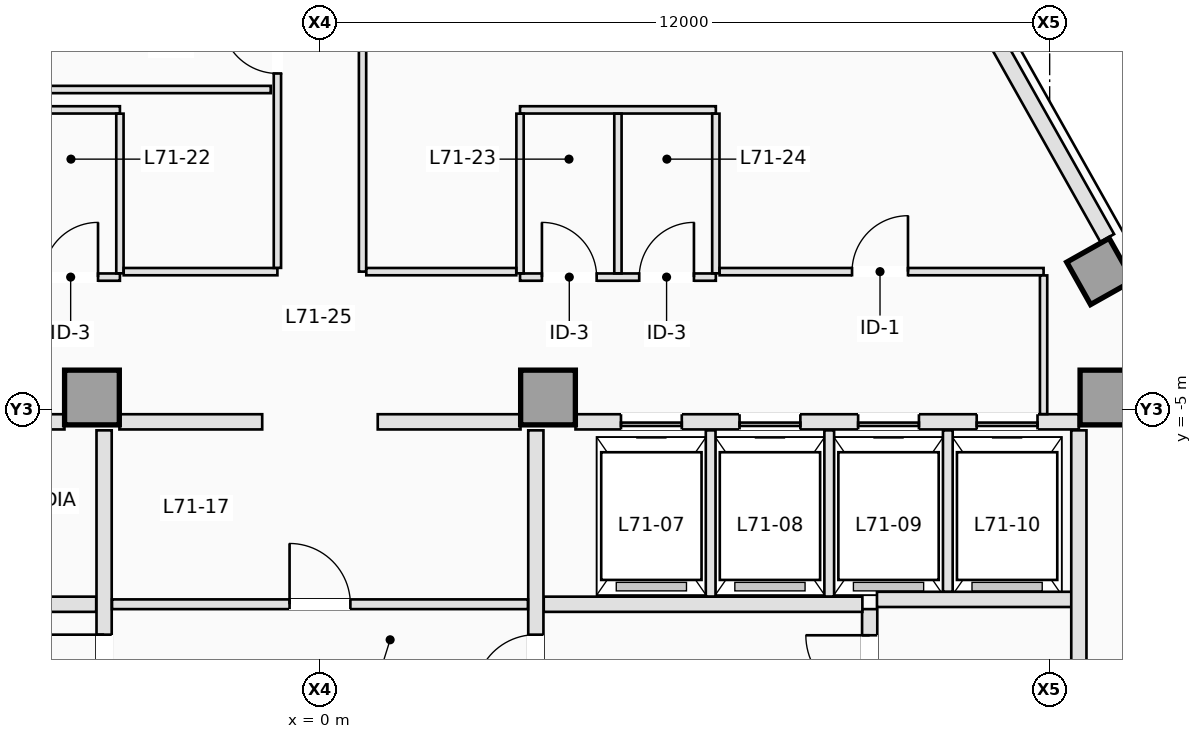
"""IFC4 building model, lengths in metres.
Left out: names, types, materials, properties, quantities, classifications, styles, units other than length and angle.
Written with IfcOpenShell. Run it as: python <this file> out.ifc"""

import sys

from ifc_helpers import new_model, si_unit, direction, frame, frame_2d, origin, origin_2d, place, context, subcontext, project, spatial, rectangle, extrude, element, fill, save


model = new_model("IFC4")
c1 = context("Model", 3, precision=1e-05, world=origin(), true_north=direction((0.0, 1.0)))
c2 = subcontext(c1, "Body", "Model", "MODEL_VIEW")
j1 = project(units=[si_unit("LENGTHUNIT", "METRE"), si_unit("PLANEANGLEUNIT", "RADIAN")], contexts=[c1])
p1 = place(None, origin())
s1 = spatial("IfcSite", under=j1, at=p1, CompositionType="ELEMENT")
p2 = place(p1, origin())
s2 = spatial("IfcBuilding", under=s1, at=p2, CompositionType="ELEMENT")
p3 = place(p2, frame((0.0, 0.0, 256.9)))
s3 = spatial("IfcBuildingStorey", under=s2, at=p3, CompositionType="ELEMENT", Elevation=256.9)
for number, where, z_axis, x_axis in (
    (1, (-3.75, -4.8, 0.0), (0.0, 0.0, 1.0), (1.0, 0.0, 0.0)),
    (2, (3.75, -4.8, 0.0), (0.0, 0.0, 1.0), (1.0, 0.0, 0.0)),
    (3, (12.95, -4.8, 0.0), (0.0, 0.0, 1.0), (1.0, 0.0, 0.0)),
):
    element("IfcColumn", number, at=place(p3, frame(where, z_axis=z_axis, x_axis=x_axis)), inside=s3, PredefinedType="COLUMN", context=c2, shape_type="SweptSolid", body=[
        extrude(rectangle(XDim=0.9, YDim=0.9, at=origin_2d()), origin(), (0.0, 0.0, 1.0), 3.5),
    ])
p4 = place(p3, frame((12.825, -2.727, 0.0), z_axis=(0.0, 0.0, 1.0), x_axis=(0.871575139605, 0.490261946333, 0.0)))
e4 = element("IfcColumn", 4, at=p4, inside=s3, PredefinedType="COLUMN", context=c2, shape_type="SweptSolid", body=[
    extrude(rectangle(XDim=0.8, YDim=0.8, at=origin_2d()), origin(), (0.0, 0.0, 1.0), 3.5),
])
p5 = place(p3, frame((10.869, 1.516, 0.0), z_axis=(0.0, 0.0, 1.0), x_axis=(0.490244825075, -0.871584770109, 0.0)))
e5 = element("IfcWall", 5, at=p5, inside=s3, PredefinedType="STANDARD", context=c2, shape_type="SweptSolid", body=[
    extrude(rectangle(XDim=4.237, YDim=0.26, at=frame_2d((2.119, 0.0))), origin(), (0.0, 0.0, 1.0), 3.25),
])
p6 = place(p3, frame((9.04, -10.18, 0.0), z_axis=(0.0, 0.0, 1.0), x_axis=(0.0, 1.0, 0.0)))
e6 = element("IfcWall", 6, at=p6, inside=s3, PredefinedType="PARTITIONING", context=c2, shape_type="SweptSolid", body=[
    extrude(rectangle(XDim=1.9, YDim=0.25, at=frame_2d((0.95, 0.0))), origin(), (0.0, 0.0, 1.0), 3.25),
])
p7 = place(p6, frame((0.42, 0.0, 0.0)))
e7 = element("IfcOpeningElement", 7, at=p7, cuts=e6, PredefinedType="OPENING", context=c2, shape_type="SweptSolid", body=[
    extrude(rectangle(XDim=1.05, YDim=2.15, at=frame_2d((0.525, 1.075))), frame((0.0, 0.135, 0.0), z_axis=(0.0, -1.0, 0.0), x_axis=(1.0, 0.0, 0.0)), (0.0, 0.0, 1.0), 0.27),
])
p8 = place(p3, frame((9.16, -8.12, 0.0), z_axis=(0.0, 0.0, 1.0), x_axis=(1.0, 0.0, 0.0)))
e8 = element("IfcWall", 8, at=p8, inside=s3, PredefinedType="PARTITIONING", context=c2, shape_type="SweptSolid", body=[
    extrude(rectangle(XDim=3.22, YDim=0.25, at=frame_2d((1.61, 0.0))), origin(), (0.0, 0.0, 1.0), 3.25),
])
p9 = place(p3, frame((12.48, -10.18, 0.0), z_axis=(0.0, 0.0, 1.0), x_axis=(0.0, 1.0, 0.0)))
e9 = element("IfcWall", 9, at=p9, inside=s3, PredefinedType="PARTITIONING", context=c2, shape_type="SweptSolid", body=[
    extrude(rectangle(XDim=4.84, YDim=0.25, at=frame_2d((2.42, 0.0))), origin(), (0.0, 0.0, 1.0), 3.25),
])
for number, where, z_axis, x_axis in (
    (10, (-8.92, -8.2, 0.0), (0.0, 0.0, 1.0), (1.0, 0.0, 0.0)),
    (11, (3.68, -8.2, 0.0), (0.0, 0.0, 1.0), (1.0, 0.0, 0.0)),
):
    element("IfcWall", number, at=place(p3, frame(where, z_axis=z_axis, x_axis=x_axis)), inside=s3, PredefinedType="PARTITIONING", context=c2, shape_type="SweptSolid", body=[
        extrude(rectangle(XDim=5.24, YDim=0.25, at=frame_2d((2.62, 0.0))), origin(), (0.0, 0.0, 1.0), 3.25),
    ])
p10 = place(p3, frame((-3.55, -15.898, 0.0), z_axis=(0.0, 0.0, 1.0), x_axis=(0.0, 1.0, 0.0)))
e12 = element("IfcWall", 12, at=p10, inside=s3, PredefinedType="PARTITIONING", context=c2, shape_type="SweptSolid", body=[
    extrude(rectangle(XDim=10.558, YDim=0.25, at=frame_2d((5.279, 0.0))), origin(), (0.0, 0.0, 1.0), 3.25),
])
p11 = place(p10, frame((6.198, 0.0, 0.0)))
e13 = element("IfcOpeningElement", 13, at=p11, cuts=e12, PredefinedType="OPENING", context=c2, shape_type="SweptSolid", body=[
    extrude(rectangle(XDim=1.0, YDim=2.15, at=frame_2d((0.5, 1.075))), frame((0.0, 0.135, 0.0), z_axis=(0.0, -1.0, 0.0), x_axis=(1.0, 0.0, 0.0)), (0.0, 0.0, 1.0), 0.27),
])
p12 = place(p3, frame((3.55, -15.898, 0.0), z_axis=(0.0, 0.0, 1.0), x_axis=(0.0, 1.0, 0.0)))
e14 = element("IfcWall", 14, at=p12, inside=s3, PredefinedType="PARTITIONING", context=c2, shape_type="SweptSolid", body=[
    extrude(rectangle(XDim=10.558, YDim=0.25, at=frame_2d((5.279, 0.0))), origin(), (0.0, 0.0, 1.0), 3.25),
])
p13 = place(p12, frame((6.198, 0.0, 0.0)))
e15 = element("IfcOpeningElement", 15, at=p13, cuts=e14, PredefinedType="OPENING", context=c2, shape_type="SweptSolid", body=[
    extrude(rectangle(XDim=1.0, YDim=2.15, at=frame_2d((0.5, 1.075))), frame((0.0, 0.135, 0.0), z_axis=(0.0, -1.0, 0.0), x_axis=(1.0, 0.0, 0.0)), (0.0, 0.0, 1.0), 0.27),
])
p14 = place(p3, frame((-12.48, -5.2, 0.0), z_axis=(0.0, 0.0, 1.0), x_axis=(1.0, 0.0, 0.0)))
e16 = element("IfcWall", 16, at=p14, inside=s3, PredefinedType="PARTITIONING", context=c2, shape_type="SweptSolid", body=[
    extrude(rectangle(XDim=8.278, YDim=0.25, at=frame_2d((4.139, 0.0))), origin(), (0.0, 0.0, 1.0), 3.25),
])
p15 = place(p14, frame((3.05, 0.0, 0.0)))
e17 = element("IfcOpeningElement", 17, at=p15, cuts=e16, PredefinedType="OPENING", context=c2, shape_type="SweptSolid", body=[
    extrude(rectangle(XDim=0.92, YDim=2.12, at=frame_2d((0.46, 1.06))), frame((0.0, 0.135, 0.0), z_axis=(0.0, -1.0, 0.0), x_axis=(1.0, 0.0, 0.0)), (0.0, 0.0, 1.0), 0.27),
])
p16 = place(p14, frame((6.15, 0.0, 0.0)))
e18 = element("IfcOpeningElement", 18, at=p16, cuts=e16, PredefinedType="OPENING", context=c2, shape_type="SweptSolid", body=[
    extrude(rectangle(XDim=0.92, YDim=2.12, at=frame_2d((0.46, 1.06))), frame((0.0, 0.135, 0.0), z_axis=(0.0, -1.0, 0.0), x_axis=(1.0, 0.0, 0.0)), (0.0, 0.0, 1.0), 0.27),
])
p17 = place(p3, frame((4.202, -5.2, 0.0), z_axis=(0.0, 0.0, 1.0), x_axis=(1.0, 0.0, 0.0)))
e19 = element("IfcWall", 19, at=p17, inside=s3, PredefinedType="PARTITIONING", context=c2, shape_type="SweptSolid", body=[
    extrude(rectangle(XDim=8.278, YDim=0.25, at=frame_2d((4.139, 0.0))), origin(), (0.0, 0.0, 1.0), 3.25),
])
p18 = place(p17, frame((0.748, 0.0, 0.0)))
e20 = element("IfcOpeningElement", 20, at=p18, cuts=e19, PredefinedType="OPENING", context=c2, shape_type="SweptSolid", body=[
    extrude(rectangle(XDim=1.0, YDim=2.15, at=frame_2d((0.5, 1.075))), frame((0.0, 0.135, 0.0), z_axis=(0.0, -1.0, 0.0), x_axis=(1.0, 0.0, 0.0)), (0.0, 0.0, 1.0), 0.27),
])
p19 = place(p17, frame((2.698, 0.0, 0.0)))
e21 = element("IfcOpeningElement", 21, at=p19, cuts=e19, PredefinedType="OPENING", context=c2, shape_type="SweptSolid", body=[
    extrude(rectangle(XDim=1.0, YDim=2.15, at=frame_2d((0.5, 1.075))), frame((0.0, 0.135, 0.0), z_axis=(0.0, -1.0, 0.0), x_axis=(1.0, 0.0, 0.0)), (0.0, 0.0, 1.0), 0.27),
])
p20 = place(p17, frame((4.648, 0.0, 0.0)))
e22 = element("IfcOpeningElement", 22, at=p20, cuts=e19, PredefinedType="OPENING", context=c2, shape_type="SweptSolid", body=[
    extrude(rectangle(XDim=1.0, YDim=2.15, at=frame_2d((0.5, 1.075))), frame((0.0, 0.135, 0.0), z_axis=(0.0, -1.0, 0.0), x_axis=(1.0, 0.0, 0.0)), (0.0, 0.0, 1.0), 0.27),
])
p21 = place(p17, frame((6.598, 0.0, 0.0)))
e23 = element("IfcOpeningElement", 23, at=p21, cuts=e19, PredefinedType="OPENING", context=c2, shape_type="SweptSolid", body=[
    extrude(rectangle(XDim=1.0, YDim=2.15, at=frame_2d((0.5, 1.075))), frame((0.0, 0.135, 0.0), z_axis=(0.0, -1.0, 0.0), x_axis=(1.0, 0.0, 0.0)), (0.0, 0.0, 1.0), 0.27),
])
for number, where, z_axis, x_axis in (
    (24, (-3.298, -5.2, 0.0), (0.0, 0.0, 1.0), (1.0, 0.0, 0.0)),
    (25, (0.95, -5.2, 0.0), (0.0, 0.0, 1.0), (1.0, 0.0, 0.0)),
):
    element("IfcWall", number, at=place(p3, frame(where, z_axis=z_axis, x_axis=x_axis)), inside=s3, PredefinedType="PARTITIONING", context=c2, shape_type="SweptSolid", body=[
        extrude(rectangle(XDim=2.348, YDim=0.25, at=frame_2d((1.174, 0.0))), origin(), (0.0, 0.0, 1.0), 3.25),
    ])
for number, where, z_axis, x_axis in (
    (26, (6.425, -8.073, 0.0), (0.0, 0.0, 1.0), (0.0, 1.0, 0.0)),
    (27, (8.375, -8.073, 0.0), (0.0, 0.0, 1.0), (0.0, 1.0, 0.0)),
):
    element("IfcWall", number, at=place(p3, frame(where, z_axis=z_axis, x_axis=x_axis)), inside=s3, PredefinedType="PARTITIONING", context=c2, shape_type="SweptSolid", body=[
        extrude(rectangle(XDim=2.733, YDim=0.16, at=frame_2d((1.366, 0.0))), origin(), (0.0, 0.0, 1.0), 3.25),
    ])
p22 = place(p3, frame((10.325, -7.993, 0.0), z_axis=(0.0, 0.0, 1.0), x_axis=(0.0, 1.0, 0.0)))
e28 = element("IfcWall", 28, at=p22, inside=s3, PredefinedType="PARTITIONING", context=c2, shape_type="SweptSolid", body=[
    extrude(rectangle(XDim=2.653, YDim=0.16, at=frame_2d((1.326, 0.0))), origin(), (0.0, 0.0, 1.0), 3.25),
])
p23 = place(p3, frame((-3.42, -8.2, 0.0), z_axis=(0.0, 0.0, 1.0), x_axis=(1.0, 0.0, 0.0)))
e29 = element("IfcWall", 29, at=p23, inside=s3, PredefinedType="PARTITIONING", context=c2, shape_type="SweptSolid", body=[
    extrude(rectangle(XDim=6.84, YDim=0.16, at=frame_2d((3.42, 0.0))), origin(), (0.0, 0.0, 1.0), 3.25),
])
p24 = place(p23, frame((2.92, 0.0, 0.0)))
e30 = element("IfcOpeningElement", 30, at=p24, cuts=e29, PredefinedType="OPENING", context=c2, shape_type="SweptSolid", body=[
    extrude(rectangle(XDim=1.0, YDim=2.15, at=frame_2d((0.5, 1.075))), frame((0.0, 0.09, 0.0), z_axis=(0.0, -1.0, 0.0), x_axis=(1.0, 0.0, 0.0)), (0.0, 0.0, 1.0), 0.18),
])
p25 = place(p3, frame((-6.51, -2.82, 0.0), z_axis=(0.0, 0.0, 1.0), x_axis=(1.0, 0.0, 0.0)))
e31 = element("IfcWall", 31, at=p25, inside=s3, PredefinedType="PARTITIONING", context=c2, shape_type="SweptSolid", body=[
    extrude(rectangle(XDim=3.22, YDim=0.12, at=frame_2d((1.61, 0.0))), origin(), (0.0, 0.0, 1.0), 2.943),
])
p26 = place(p25, frame((0.36, 0.0, 0.0)))
e32 = element("IfcOpeningElement", 32, at=p26, cuts=e31, PredefinedType="OPENING", context=c2, shape_type="SweptSolid", body=[
    extrude(rectangle(XDim=0.9, YDim=2.12, at=frame_2d((0.45, 1.06))), frame((0.0, 0.07, 0.0), z_axis=(0.0, -1.0, 0.0), x_axis=(1.0, 0.0, 0.0)), (0.0, 0.0, 1.0), 0.14),
])
p27 = place(p25, frame((1.96, 0.0, 0.0)))
e33 = element("IfcOpeningElement", 33, at=p27, cuts=e31, PredefinedType="OPENING", context=c2, shape_type="SweptSolid", body=[
    extrude(rectangle(XDim=0.9, YDim=2.12, at=frame_2d((0.45, 1.06))), frame((0.0, 0.07, 0.0), z_axis=(0.0, -1.0, 0.0), x_axis=(1.0, 0.0, 0.0)), (0.0, 0.0, 1.0), 0.14),
])
p28 = place(p3, frame((-6.51, -0.07, 0.0), z_axis=(0.0, 0.0, 1.0), x_axis=(1.0, 0.0, 0.0)))
e34 = element("IfcWall", 34, at=p28, inside=s3, PredefinedType="PARTITIONING", context=c2, shape_type="SweptSolid", body=[
    extrude(rectangle(XDim=3.22, YDim=0.12, at=frame_2d((1.61, 0.0))), origin(), (0.0, 0.0, 1.0), 3.25),
])
p29 = place(p3, frame((-3.29, -2.758, 0.0), z_axis=(0.0, 0.0, 1.0), x_axis=(0.0, 1.0, 0.0)))
e35 = element("IfcWall", 35, at=p29, inside=s3, PredefinedType="PARTITIONING", context=c2, shape_type="SweptSolid", body=[
    extrude(rectangle(XDim=2.626, YDim=0.12, at=frame_2d((1.313, 0.0))), origin(), (0.0, 0.0, 1.0), 2.79),
])
p30 = place(p3, frame((3.29, -2.82, 0.0), z_axis=(0.0, 0.0, 1.0), x_axis=(1.0, 0.0, 0.0)))
e36 = element("IfcWall", 36, at=p30, inside=s3, PredefinedType="PARTITIONING", context=c2, shape_type="SweptSolid", body=[
    extrude(rectangle(XDim=3.22, YDim=0.12, at=frame_2d((1.61, 0.0))), origin(), (0.0, 0.0, 1.0), 2.943),
])
p31 = place(p30, frame((0.36, 0.0, 0.0)))
e37 = element("IfcOpeningElement", 37, at=p31, cuts=e36, PredefinedType="OPENING", context=c2, shape_type="SweptSolid", body=[
    extrude(rectangle(XDim=0.9, YDim=2.12, at=frame_2d((0.45, 1.06))), frame((0.0, 0.07, 0.0), z_axis=(0.0, -1.0, 0.0), x_axis=(1.0, 0.0, 0.0)), (0.0, 0.0, 1.0), 0.14),
])
p32 = place(p30, frame((1.96, 0.0, 0.0)))
e38 = element("IfcOpeningElement", 38, at=p32, cuts=e36, PredefinedType="OPENING", context=c2, shape_type="SweptSolid", body=[
    extrude(rectangle(XDim=0.9, YDim=2.12, at=frame_2d((0.45, 1.06))), frame((0.0, 0.07, 0.0), z_axis=(0.0, -1.0, 0.0), x_axis=(1.0, 0.0, 0.0)), (0.0, 0.0, 1.0), 0.14),
])
p33 = place(p3, frame((3.29, -0.07, 0.0), z_axis=(0.0, 0.0, 1.0), x_axis=(1.0, 0.0, 0.0)))
e39 = element("IfcWall", 39, at=p33, inside=s3, PredefinedType="PARTITIONING", context=c2, shape_type="SweptSolid", body=[
    extrude(rectangle(XDim=3.22, YDim=0.12, at=frame_2d((1.61, 0.0))), origin(), (0.0, 0.0, 1.0), 3.25),
])
p34 = place(p3, frame((3.29, -2.758, 0.0), z_axis=(0.0, 0.0, 1.0), x_axis=(0.0, 1.0, 0.0)))
e40 = element("IfcWall", 40, at=p34, inside=s3, PredefinedType="PARTITIONING", context=c2, shape_type="SweptSolid", body=[
    extrude(rectangle(XDim=2.626, YDim=0.12, at=frame_2d((1.313, 0.0))), origin(), (0.0, 0.0, 1.0), 2.79),
])
for number, where, z_axis, x_axis in (
    (41, (4.9, -2.758, 0.0), (0.0, 0.0, 1.0), (0.0, 1.0, 0.0)),
    (42, (6.51, -2.758, 0.0), (0.0, 0.0, 1.0), (0.0, 1.0, 0.0)),
):
    element("IfcWall", number, at=place(p3, frame(where, z_axis=z_axis, x_axis=x_axis)), inside=s3, PredefinedType="PARTITIONING", context=c2, shape_type="SweptSolid", body=[
        extrude(rectangle(XDim=2.626, YDim=0.12, at=frame_2d((1.313, 0.0))), origin(), (0.0, 0.0, 1.0), 3.25),
    ])
p35 = place(p3, frame((-3.228, -2.73, 0.0), z_axis=(0.0, 0.0, 1.0), x_axis=(1.0, 0.0, 0.0)))
e43 = element("IfcWall", 43, at=p35, inside=s3, PredefinedType="PARTITIONING", context=c2, shape_type="SweptSolid", body=[
    extrude(rectangle(XDim=2.528, YDim=0.12, at=frame_2d((1.264, 0.0))), origin(), (0.0, 0.0, 1.0), 2.943),
])
p36 = place(p3, frame((-0.7, -2.668, 0.0), z_axis=(0.0, 0.0, 1.0), x_axis=(0.0, 1.0, 0.0)))
e44 = element("IfcWall", 44, at=p36, inside=s3, PredefinedType="PARTITIONING", context=c2, shape_type="SweptSolid", body=[
    extrude(rectangle(XDim=5.968, YDim=0.12, at=frame_2d((2.984, 0.0))), origin(), (0.0, 0.0, 1.0), 3.25),
])
p37 = place(p36, frame((3.197, 0.0, 0.0)))
e45 = element("IfcOpeningElement", 45, at=p37, cuts=e44, PredefinedType="OPENING", context=c2, shape_type="SweptSolid", body=[
    extrude(rectangle(XDim=0.92, YDim=2.12, at=frame_2d((0.46, 1.06))), frame((0.0, 0.07, 0.0), z_axis=(0.0, -1.0, 0.0), x_axis=(1.0, 0.0, 0.0)), (0.0, 0.0, 1.0), 0.14),
])
p38 = place(p3, frame((0.7, 3.238, 0.0), z_axis=(0.0, 0.0, 1.0), x_axis=(0.0, -1.0, 0.0)))
e46 = element("IfcWall", 46, at=p38, inside=s3, PredefinedType="PARTITIONING", context=c2, shape_type="SweptSolid", body=[
    extrude(rectangle(XDim=5.968, YDim=0.12, at=frame_2d((2.984, 0.0))), origin(), (0.0, 0.0, 1.0), 3.25),
])
p39 = place(p3, frame((0.762, -2.73, 0.0), z_axis=(0.0, 0.0, 1.0), x_axis=(1.0, 0.0, 0.0)))
e47 = element("IfcWall", 47, at=p39, inside=s3, PredefinedType="PARTITIONING", context=c2, shape_type="SweptSolid", body=[
    extrude(rectangle(XDim=2.466, YDim=0.12, at=frame_2d((1.233, 0.0))), origin(), (0.0, 0.0, 1.0), 2.943),
])
p40 = place(p3, frame((6.572, -2.73, 0.0), z_axis=(0.0, 0.0, 1.0), x_axis=(1.0, 0.0, 0.0)))
e48 = element("IfcWall", 48, at=p40, inside=s3, PredefinedType="PARTITIONING", context=c2, shape_type="SweptSolid", body=[
    extrude(rectangle(XDim=5.328, YDim=0.12, at=frame_2d((2.664, 0.0))), origin(), (0.0, 0.0, 1.0), 3.25),
])
p41 = place(p40, frame((2.178, 0.0, 0.0)))
e49 = element("IfcOpeningElement", 49, at=p41, cuts=e48, PredefinedType="OPENING", context=c2, shape_type="SweptSolid", body=[
    extrude(rectangle(XDim=0.92, YDim=2.12, at=frame_2d((0.46, 1.06))), frame((0.0, 0.07, 0.0), z_axis=(0.0, -1.0, 0.0), x_axis=(1.0, 0.0, 0.0)), (0.0, 0.0, 1.0), 0.14),
])
p42 = place(p3, frame((11.9, -2.792, 0.0), z_axis=(0.0, 0.0, 1.0), x_axis=(0.0, -1.0, 0.0)))
e50 = element("IfcWall", 50, at=p42, inside=s3, PredefinedType="PARTITIONING", context=c2, shape_type="SweptSolid", body=[
    extrude(rectangle(XDim=2.281, YDim=0.12, at=frame_2d((1.141, 0.0))), origin(), (0.0, 0.0, 1.0), 3.25),
])
p43 = place(p3, frame((-0.81, 0.265, 0.0), z_axis=(0.0, 0.0, 1.0), x_axis=(-1.0, 0.0, 0.0)))
e51 = element("IfcWall", 51, at=p43, inside=s3, PredefinedType="PARTITIONING", context=c2, shape_type="SweptSolid", body=[
    extrude(rectangle(XDim=10.611, YDim=0.12, at=frame_2d((5.306, 0.0))), origin(), (0.0, 0.0, 1.0), 3.25),
])
p44 = place(p18, origin())
e52 = element("IfcDoor", 52, at=p44, inside=s3, OperationType="SLIDING_TO_RIGHT", PredefinedType="DOOR", context=c2, shape_type="SweptSolid", body=[
    extrude(rectangle(XDim=1.0, YDim=2.15, at=frame_2d((0.5, 1.075))), frame((0.0, 0.025, 0.0), z_axis=(0.0, -1.0, 0.0), x_axis=(1.0, 0.0, 0.0)), (0.0, 0.0, 1.0), 0.05),
])
fill(e20, e52)
p45 = place(p19, origin())
e53 = element("IfcDoor", 53, at=p45, inside=s3, OperationType="SLIDING_TO_RIGHT", PredefinedType="DOOR", context=c2, shape_type="SweptSolid", body=[
    extrude(rectangle(XDim=1.0, YDim=2.15, at=frame_2d((0.5, 1.075))), frame((0.0, 0.025, 0.0), z_axis=(0.0, -1.0, 0.0), x_axis=(1.0, 0.0, 0.0)), (0.0, 0.0, 1.0), 0.05),
])
fill(e21, e53)
p46 = place(p20, origin())
e54 = element("IfcDoor", 54, at=p46, inside=s3, OperationType="SLIDING_TO_RIGHT", PredefinedType="DOOR", context=c2, shape_type="SweptSolid", body=[
    extrude(rectangle(XDim=1.0, YDim=2.15, at=frame_2d((0.5, 1.075))), frame((0.0, 0.025, 0.0), z_axis=(0.0, -1.0, 0.0), x_axis=(1.0, 0.0, 0.0)), (0.0, 0.0, 1.0), 0.05),
])
fill(e22, e54)
p47 = place(p21, origin())
e55 = element("IfcDoor", 55, at=p47, inside=s3, OperationType="SLIDING_TO_RIGHT", PredefinedType="DOOR", context=c2, shape_type="SweptSolid", body=[
    extrude(rectangle(XDim=1.0, YDim=2.15, at=frame_2d((0.5, 1.075))), frame((0.0, 0.025, 0.0), z_axis=(0.0, -1.0, 0.0), x_axis=(1.0, 0.0, 0.0)), (0.0, 0.0, 1.0), 0.05),
])
fill(e23, e55)
p48 = place(p7, origin())
e56 = element("IfcDoor", 56, at=p48, inside=s3, OperationType="SINGLE_SWING_RIGHT", PredefinedType="DOOR", context=c2, shape_type="SweptSolid", body=[
    extrude(rectangle(XDim=1.05, YDim=2.15, at=frame_2d((0.525, 1.075))), frame((0.0, 0.025, 0.0), z_axis=(0.0, -1.0, 0.0), x_axis=(1.0, 0.0, 0.0)), (0.0, 0.0, 1.0), 0.05),
])
fill(e7, e56)
p49 = place(p11, origin())
e57 = element("IfcDoor", 57, at=p49, inside=s3, OperationType="SINGLE_SWING_RIGHT", PredefinedType="DOOR", context=c2, shape_type="SweptSolid", body=[
    extrude(rectangle(XDim=1.0, YDim=2.15, at=frame_2d((0.5, 1.075))), frame((0.0, 0.025, 0.0), z_axis=(0.0, -1.0, 0.0), x_axis=(1.0, 0.0, 0.0)), (0.0, 0.0, 1.0), 0.05),
])
fill(e13, e57)
p50 = place(p13, origin())
e58 = element("IfcDoor", 58, at=p50, inside=s3, OperationType="SINGLE_SWING_LEFT", PredefinedType="DOOR", context=c2, shape_type="SweptSolid", body=[
    extrude(rectangle(XDim=1.0, YDim=2.15, at=frame_2d((0.5, 1.075))), frame((0.0, 0.025, 0.0), z_axis=(0.0, -1.0, 0.0), x_axis=(1.0, 0.0, 0.0)), (0.0, 0.0, 1.0), 0.05),
])
fill(e15, e58)
p51 = place(p24, origin())
e59 = element("IfcDoor", 59, at=p51, inside=s3, OperationType="SINGLE_SWING_LEFT", PredefinedType="DOOR", context=c2, shape_type="SweptSolid", body=[
    extrude(rectangle(XDim=1.0, YDim=2.15, at=frame_2d((0.5, 1.075))), frame((0.0, 0.025, 0.0), z_axis=(0.0, -1.0, 0.0), x_axis=(1.0, 0.0, 0.0)), (0.0, 0.0, 1.0), 0.05),
])
fill(e30, e59)
p52 = place(p27, origin())
e60 = element("IfcDoor", 60, at=p52, inside=s3, OperationType="SINGLE_SWING_RIGHT", PredefinedType="DOOR", context=c2, shape_type="SweptSolid", body=[
    extrude(rectangle(XDim=0.9, YDim=2.12, at=frame_2d((0.45, 1.06))), frame((0.0, 0.025, 0.0), z_axis=(0.0, -1.0, 0.0), x_axis=(1.0, 0.0, 0.0)), (0.0, 0.0, 1.0), 0.05),
])
fill(e33, e60)
p53 = place(p31, origin())
e61 = element("IfcDoor", 61, at=p53, inside=s3, OperationType="SINGLE_SWING_LEFT", PredefinedType="DOOR", context=c2, shape_type="SweptSolid", body=[
    extrude(rectangle(XDim=0.9, YDim=2.12, at=frame_2d((0.45, 1.06))), frame((0.0, 0.025, 0.0), z_axis=(0.0, -1.0, 0.0), x_axis=(1.0, 0.0, 0.0)), (0.0, 0.0, 1.0), 0.05),
])
fill(e37, e61)
p54 = place(p32, origin())
e62 = element("IfcDoor", 62, at=p54, inside=s3, OperationType="SINGLE_SWING_RIGHT", PredefinedType="DOOR", context=c2, shape_type="SweptSolid", body=[
    extrude(rectangle(XDim=0.9, YDim=2.12, at=frame_2d((0.45, 1.06))), frame((0.0, 0.025, 0.0), z_axis=(0.0, -1.0, 0.0), x_axis=(1.0, 0.0, 0.0)), (0.0, 0.0, 1.0), 0.05),
])
fill(e38, e62)
p55 = place(p37, origin())
e63 = element("IfcDoor", 63, at=p55, inside=s3, OperationType="SINGLE_SWING_RIGHT", PredefinedType="DOOR", context=c2, shape_type="SweptSolid", body=[
    extrude(rectangle(XDim=0.92, YDim=2.12, at=frame_2d((0.46, 1.06))), frame((0.0, 0.025, 0.0), z_axis=(0.0, -1.0, 0.0), x_axis=(1.0, 0.0, 0.0)), (0.0, 0.0, 1.0), 0.05),
])
fill(e45, e63)
p56 = place(p41, origin())
e64 = element("IfcDoor", 64, at=p56, inside=s3, OperationType="SINGLE_SWING_RIGHT", PredefinedType="DOOR", context=c2, shape_type="SweptSolid", body=[
    extrude(rectangle(XDim=0.92, YDim=2.12, at=frame_2d((0.46, 1.06))), frame((0.0, 0.025, 0.0), z_axis=(0.0, -1.0, 0.0), x_axis=(1.0, 0.0, 0.0)), (0.0, 0.0, 1.0), 0.05),
])
fill(e49, e64)
save(model, sys.argv[1])
